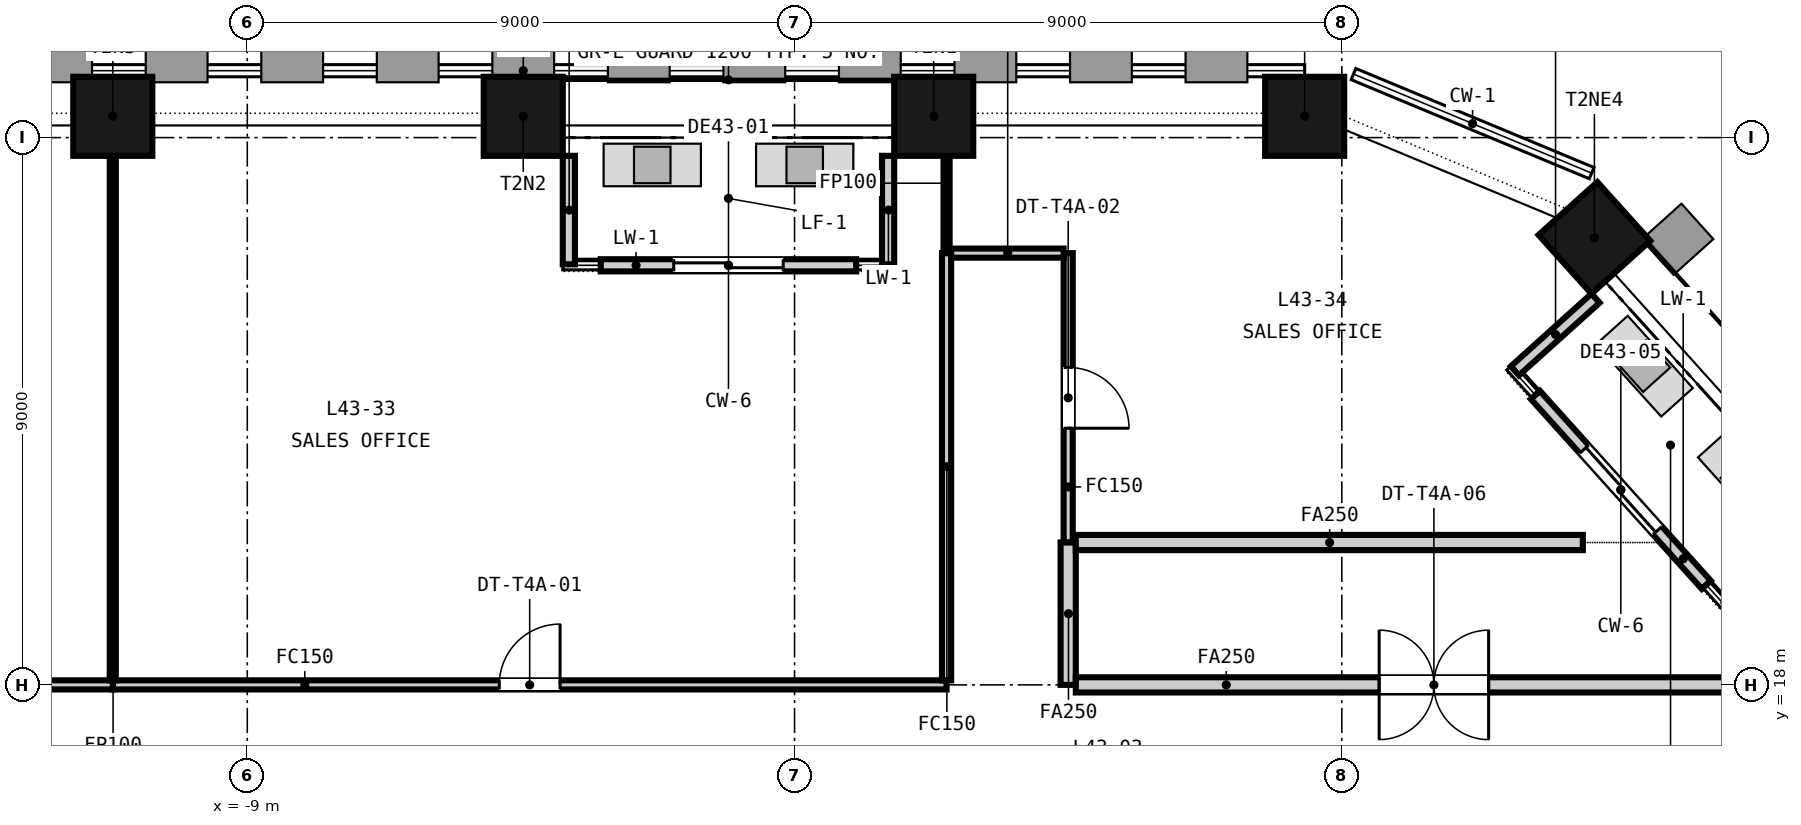
"""IFC4 building model, lengths in metres.
Left out: names, types, materials, properties, quantities, classifications, styles, units other than length and angle.
Written with IfcOpenShell. Run it as: python <this file> out.ifc"""

import sys

from ifc_helpers import new_model, si_unit, direction, frame, frame_2d, origin, origin_2d, place, context, subcontext, project, spatial, rectangle, extrude, element, fill, save


model = new_model("IFC4")
c1 = context("Model", 3, precision=1e-05, world=origin(), true_north=direction((0.0, 1.0)))
c2 = subcontext(c1, "Body", "Model", "MODEL_VIEW")
j1 = project(units=[si_unit("LENGTHUNIT", "METRE"), si_unit("PLANEANGLEUNIT", "RADIAN")], contexts=[c1])
p1 = place(None, origin())
s1 = spatial("IfcSite", under=j1, at=p1, CompositionType="ELEMENT")
p2 = place(p1, origin())
s2 = spatial("IfcBuilding", under=s1, at=p2, CompositionType="ELEMENT")
p3 = place(p2, frame((0.0, 0.0, 174.45)))
s3 = spatial("IfcBuildingStorey", under=s2, at=p3, CompositionType="ELEMENT", Elevation=174.45)
for number, where, z_axis, x_axis in (
    (1, (8.389, 27.35, -0.15), (0.0, 0.0, 1.0), (-1.0, 0.0, 0.0)),
    (2, (2.288, 27.35, -0.15), (0.0, 0.0, 1.0), (-1.0, 0.0, 0.0)),
    (3, (-4.462, 27.35, -0.15), (0.0, 0.0, 1.0), (-1.0, 0.0, 0.0)),
    (4, (-11.212, 27.35, -0.15), (0.0, 0.0, 1.0), (-1.0, 0.0, 0.0)),
    (5, (13.154, 25.351, -0.15), (0.0, 0.0, 1.0), (-0.669, 0.743, 0.0)),
):
    element("IfcColumn", number, at=place(p3, frame(where, z_axis=z_axis, x_axis=x_axis)), inside=s3, PredefinedType="COLUMN", context=c2, shape_type="SweptSolid", body=[
        extrude(rectangle(XDim=1.3, YDim=1.3, at=origin_2d()), origin(), (0.0, 0.0, 1.0), 3.65),
    ])
p4 = place(p3, frame((1.013, 24.9, 0.0), z_axis=(0.0, 0.0, 1.0), x_axis=(-1.0, 0.0, 0.0)))
e6 = element("IfcWall", 6, at=p4, inside=s3, PredefinedType="SOLIDWALL", context=c2, shape_type="SweptSolid", body=[
    extrude(rectangle(XDim=4.2, YDim=0.2, at=frame_2d((2.1, 0.0))), origin(), (0.0, 0.0, 1.0), 3.05),
])
p5 = place(p4, frame((1.2, 0.0, 0.0)))
e7 = element("IfcOpeningElement", 7, at=p5, cuts=e6, PredefinedType="OPENING", context=c2, shape_type="SweptSolid", body=[
    extrude(rectangle(XDim=1.8, YDim=2.4, at=frame_2d((0.9, 1.2))), frame((0.0, 0.11, 0.0), z_axis=(0.0, -1.0, 0.0), x_axis=(1.0, 0.0, 0.0)), (0.0, 0.0, 1.0), 0.22),
])
for number, where, z_axis, x_axis in (
    (8, (1.538, 26.7, 0.0), (0.0, 0.0, 1.0), (0.0, -1.0, 0.0)),
    (9, (-3.712, 26.7, 0.0), (0.0, 0.0, 1.0), (0.0, -1.0, 0.0)),
):
    element("IfcWall", number, at=place(p3, frame(where, z_axis=z_axis, x_axis=x_axis)), inside=s3, PredefinedType="SOLIDWALL", context=c2, shape_type="SweptSolid", body=[
        extrude(rectangle(XDim=1.784, YDim=0.2, at=frame_2d((0.892, 0.0))), origin(), (0.0, 0.0, 1.0), 3.05),
    ])
p6 = place(p3, frame((14.993, 19.646, 0.0), z_axis=(0.0, 0.0, 1.0), x_axis=(-0.669138140895, 0.743138041282, 0.0)))
e10 = element("IfcWall", 10, at=p6, inside=s3, PredefinedType="SOLIDWALL", context=c2, shape_type="SweptSolid", body=[
    extrude(rectangle(XDim=4.2, YDim=0.2, at=frame_2d((2.1, 0.0))), origin(), (0.0, 0.0, 1.0), 2.897),
])
p7 = place(p6, frame((1.2, 0.0, 0.0)))
e11 = element("IfcOpeningElement", 11, at=p7, cuts=e10, PredefinedType="OPENING", context=c2, shape_type="SweptSolid", body=[
    extrude(rectangle(XDim=1.8, YDim=2.4, at=frame_2d((0.9, 1.2))), frame((0.0, 0.11, 0.0), z_axis=(0.0, -1.0, 0.0), x_axis=(1.0, 0.0, 0.0)), (0.0, 0.0, 1.0), 0.22),
])
p8 = place(p3, frame((13.173, 24.359, 0.0), z_axis=(0.0, 0.0, 1.0), x_axis=(-0.743151246267, -0.66912347528, 0.0)))
e12 = element("IfcWall", 12, at=p8, inside=s3, PredefinedType="SOLIDWALL", context=c2, shape_type="SweptSolid", body=[
    extrude(rectangle(XDim=1.784, YDim=0.2, at=frame_2d((0.892, 0.0))), origin(), (0.0, 0.0, 1.0), 3.05),
])
p9 = place(p3, frame((4.5, 25.1, 0.0), z_axis=(0.0, 0.0, 1.0), x_axis=(0.0, -1.0, 0.0)))
e13 = element("IfcWall", 13, at=p9, inside=s3, PredefinedType="PARTITIONING", context=c2, shape_type="SweptSolid", body=[
    extrude(rectangle(XDim=4.759, YDim=0.15, at=frame_2d((2.379, 0.0))), origin(), (0.0, 0.0, 1.0), 2.741),
])
p10 = place(p9, frame((1.879, 0.0, 0.0)))
e14 = element("IfcOpeningElement", 14, at=p10, cuts=e13, PredefinedType="OPENING", context=c2, shape_type="SweptSolid", body=[
    extrude(rectangle(XDim=1.0, YDim=2.1, at=frame_2d((0.5, 1.05))), frame((0.0, 0.085, 0.0), z_axis=(0.0, -1.0, 0.0), x_axis=(1.0, 0.0, 0.0)), (0.0, 0.0, 1.0), 0.17),
])
p11 = place(p3, frame((4.5, 20.341, 0.0), z_axis=(0.0, 0.0, 1.0), x_axis=(0.0, -1.0, 0.0)))
e15 = element("IfcWall", 15, at=p11, inside=s3, PredefinedType="PARTITIONING", context=c2, shape_type="SweptSolid", body=[
    extrude(rectangle(XDim=2.341, YDim=0.25, at=frame_2d((1.17, 0.0))), origin(), (0.0, 0.0, 1.0), 2.741),
])
p12 = place(p3, frame((-11.212, 18.0, 0.0), z_axis=(0.0, 0.0, 1.0), x_axis=(1.0, 0.0, 0.0)))
e16 = element("IfcWall", 16, at=p12, inside=s3, PredefinedType="PARTITIONING", context=c2, shape_type="SweptSolid", body=[
    extrude(rectangle(XDim=13.712, YDim=0.15, at=frame_2d((6.856, 0.0))), origin(), (0.0, 0.0, 1.0), 2.741),
])
p13 = place(p12, frame((6.356, 0.0, 0.0)))
e17 = element("IfcOpeningElement", 17, at=p13, cuts=e16, PredefinedType="OPENING", context=c2, shape_type="SweptSolid", body=[
    extrude(rectangle(XDim=1.0, YDim=2.1, at=frame_2d((0.5, 1.05))), frame((0.0, 0.085, 0.0), z_axis=(0.0, -1.0, 0.0), x_axis=(1.0, 0.0, 0.0)), (0.0, 0.0, 1.0), 0.17),
])
p14 = place(p3, frame((2.5, 18.075, 0.0), z_axis=(0.0, 0.0, 1.0), x_axis=(0.0, 1.0, 0.0)))
e18 = element("IfcWall", 18, at=p14, inside=s3, PredefinedType="PARTITIONING", context=c2, shape_type="SweptSolid", body=[
    extrude(rectangle(XDim=7.025, YDim=0.15, at=frame_2d((3.513, 0.0))), origin(), (0.0, 0.0, 1.0), 2.741),
])
p15 = place(p3, frame((2.5, 25.1, 0.0), z_axis=(0.0, 0.0, 1.0), x_axis=(0.0, 1.0, 0.0)))
e19 = element("IfcWall", 19, at=p15, inside=s3, PredefinedType="PARTITIONING", context=c2, shape_type="SweptSolid", body=[
    extrude(rectangle(XDim=2.3, YDim=0.1, at=frame_2d((1.15, 0.0))), origin(), (0.0, 0.0, 1.0), 2.741),
])
p16 = place(p3, frame((2.575, 25.1, 0.0), z_axis=(0.0, 0.0, 1.0), x_axis=(1.0, 0.0, 0.0)))
e20 = element("IfcWall", 20, at=p16, inside=s3, PredefinedType="PARTITIONING", context=c2, shape_type="SweptSolid", body=[
    extrude(rectangle(XDim=1.85, YDim=0.15, at=frame_2d((0.925, 0.0))), origin(), (0.0, 0.0, 1.0), 2.741),
])
p17 = place(p3, frame((4.625, 20.341, 0.0), z_axis=(0.0, 0.0, 1.0), x_axis=(1.0, 0.0, 0.0)))
e21 = element("IfcWall", 21, at=p17, inside=s3, PredefinedType="PARTITIONING", context=c2, shape_type="SweptSolid", body=[
    extrude(rectangle(XDim=8.339, YDim=0.25, at=frame_2d((4.169, 0.0))), origin(), (0.0, 0.0, 1.0), 2.741),
])
p18 = place(p3, frame((-16.328, 18.0, 0.0), z_axis=(0.0, 0.0, 1.0), x_axis=(1.0, 0.0, 0.0)))
e22 = element("IfcWall", 22, at=p18, inside=s3, PredefinedType="PARTITIONING", context=c2, shape_type="SweptSolid", body=[
    extrude(rectangle(XDim=5.116, YDim=0.15, at=frame_2d((2.558, 0.0))), origin(), (0.0, 0.0, 1.0), 2.741),
])
p19 = place(p3, frame((-11.212, 18.075, 0.0), z_axis=(0.0, 0.0, 1.0), x_axis=(0.0, 1.0, 0.0)))
e23 = element("IfcWall", 23, at=p19, inside=s3, PredefinedType="PARTITIONING", context=c2, shape_type="SweptSolid", body=[
    extrude(rectangle(XDim=9.325, YDim=0.1, at=frame_2d((4.663, 0.0))), origin(), (0.0, 0.0, 1.0), 2.741),
])
p20 = place(p3, frame((4.625, 18.0, 0.0), z_axis=(0.0, 0.0, 1.0), x_axis=(1.0, 0.0, 0.0)))
e24 = element("IfcWall", 24, at=p20, inside=s3, PredefinedType="PARTITIONING", context=c2, shape_type="SweptSolid", body=[
    extrude(rectangle(XDim=11.778, YDim=0.25, at=frame_2d((5.889, 0.0))), origin(), (0.0, 0.0, 1.0), 2.741),
])
p21 = place(p20, frame((4.989, 0.0, 0.0)))
e25 = element("IfcOpeningElement", 25, at=p21, cuts=e24, PredefinedType="OPENING", context=c2, shape_type="SweptSolid", body=[
    extrude(rectangle(XDim=1.8, YDim=2.1, at=frame_2d((0.9, 1.05))), frame((0.0, 0.135, 0.0), z_axis=(0.0, -1.0, 0.0), x_axis=(1.0, 0.0, 0.0)), (0.0, 0.0, 1.0), 0.27),
])
p22 = place(p5, origin())
e26 = element("IfcDoor", 26, at=p22, inside=s3, OperationType="SINGLE_SWING_LEFT", PredefinedType="DOOR", context=c2, shape_type="SweptSolid", body=[
    extrude(rectangle(XDim=1.8, YDim=2.4, at=frame_2d((0.9, 1.2))), frame((0.0, 0.025, 0.0), z_axis=(0.0, -1.0, 0.0), x_axis=(1.0, 0.0, 0.0)), (0.0, 0.0, 1.0), 0.05),
])
fill(e7, e26)
p23 = place(p7, origin())
e27 = element("IfcDoor", 27, at=p23, inside=s3, OperationType="SINGLE_SWING_LEFT", PredefinedType="DOOR", context=c2, shape_type="SweptSolid", body=[
    extrude(rectangle(XDim=1.8, YDim=2.4, at=frame_2d((0.9, 1.2))), frame((0.0, 0.025, 0.0), z_axis=(0.0, -1.0, 0.0), x_axis=(1.0, 0.0, 0.0)), (0.0, 0.0, 1.0), 0.05),
])
fill(e11, e27)
p24 = place(p13, origin())
e28 = element("IfcDoor", 28, at=p24, inside=s3, OperationType="SINGLE_SWING_RIGHT", PredefinedType="DOOR", context=c2, shape_type="SweptSolid", body=[
    extrude(rectangle(XDim=1.0, YDim=2.1, at=frame_2d((0.5, 1.05))), frame((0.0, 0.025, 0.0), z_axis=(0.0, -1.0, 0.0), x_axis=(1.0, 0.0, 0.0)), (0.0, 0.0, 1.0), 0.05),
])
fill(e17, e28)
p25 = place(p10, origin())
e29 = element("IfcDoor", 29, at=p25, inside=s3, OperationType="SINGLE_SWING_RIGHT", PredefinedType="DOOR", context=c2, shape_type="SweptSolid", body=[
    extrude(rectangle(XDim=1.0, YDim=2.1, at=frame_2d((0.5, 1.05))), frame((0.0, 0.025, 0.0), z_axis=(0.0, -1.0, 0.0), x_axis=(1.0, 0.0, 0.0)), (0.0, 0.0, 1.0), 0.05),
])
fill(e14, e29)
p26 = place(p21, origin())
e30 = element("IfcDoor", 30, at=p26, inside=s3, OperationType="DOUBLE_DOOR_DOUBLE_SWING", PredefinedType="DOOR", context=c2, shape_type="SweptSolid", body=[
    extrude(rectangle(XDim=1.8, YDim=2.1, at=frame_2d((0.9, 1.05))), frame((0.0, 0.025, 0.0), z_axis=(0.0, -1.0, 0.0), x_axis=(1.0, 0.0, 0.0)), (0.0, 0.0, 1.0), 0.05),
])
fill(e25, e30)
save(model, sys.argv[1])
